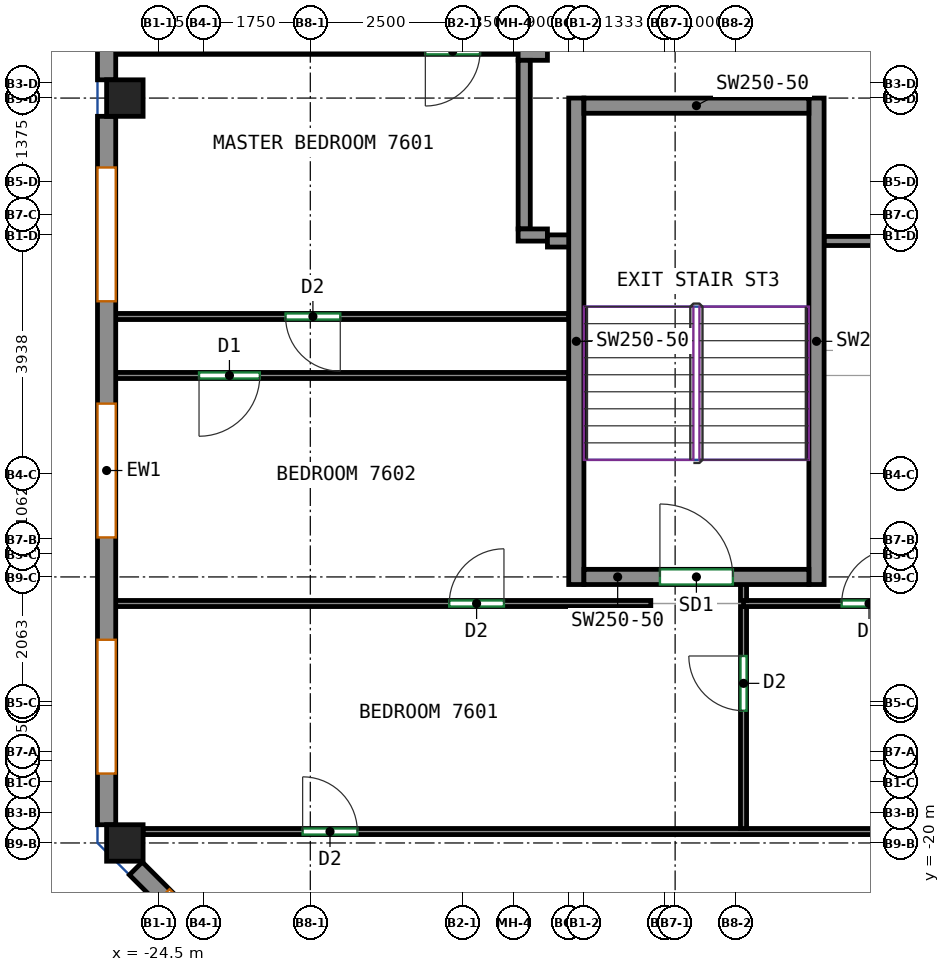
"""IFC4 building model, lengths in metres.
Left out: names, types, materials, properties, quantities, classifications, styles, units other than length and angle.
Written with IfcOpenShell. Run it as: python <this file> out.ifc"""

import sys

from ifc_helpers import new_model, si_unit, direction, frame, frame_2d, origin, origin_2d, place, context, subcontext, project, spatial, rectangle, extrude, source, transform, mapped, element, fill, save


model = new_model("IFC4")
c1 = context("Model", 3, precision=1e-05, world=origin(), true_north=direction((0.0, 1.0)))
c2 = subcontext(c1, "Body", "Model", "MODEL_VIEW")
j1 = project(units=[si_unit("LENGTHUNIT", "METRE"), si_unit("PLANEANGLEUNIT", "RADIAN")], contexts=[c1])
p1 = place(None, origin())
s1 = spatial("IfcSite", under=j1, at=p1, CompositionType="ELEMENT")
p2 = place(p1, origin())
s2 = spatial("IfcBuilding", under=s1, at=p2, CompositionType="ELEMENT")
p3 = place(p2, frame((0.0, 0.0, 305.2)))
s3 = spatial("IfcBuildingStorey", under=s2, at=p3, CompositionType="ELEMENT", Elevation=305.2)
m1 = source(origin(), c2, "Body", "SweptSolid", [
    extrude(rectangle(XDim=0.6, YDim=0.6, at=origin_2d()), origin(), (0.0, 0.0, 1.0), 3.12),
])
for number, where, z_axis, x_axis in (
    (1, (-25.05, -20.0, 0.0), (0.0, 0.0, 1.0), (1.0, 0.0, 0.0)),
    (2, (-25.05, -7.75, 0.0), (0.0, 0.0, 1.0), (1.0, 0.0, 0.0)),
):
    element("IfcColumn", number, at=place(p3, frame(where, z_axis=z_axis, x_axis=x_axis)), inside=s3, PredefinedType="COLUMN", context=c2, shape_type="MappedRepresentation", body=[
        mapped(m1, transform((0.0, 0.0, 0.0))),
    ])
m2 = source(origin(), c2, "Body", "SweptSolid", [
    extrude(rectangle(XDim=8.0, YDim=0.25, at=frame_2d((4.0, 0.0))), origin(), (0.0, 0.0, 1.0), 3.12),
])
for number, where, z_axis, x_axis in (
    (3, (-17.625, -15.75, 0.0), (0.0, 0.0, 1.0), (0.0, 1.0, 0.0)),
    (4, (-13.675, -15.75, 0.0), (0.0, 0.0, 1.0), (0.0, 1.0, 0.0)),
):
    element("IfcWall", number, at=place(p3, frame(where, z_axis=z_axis, x_axis=x_axis)), inside=s3, PredefinedType="SHEAR", context=c2, shape_type="MappedRepresentation", body=[
        mapped(m2, transform((0.0, 0.0, 0.0))),
    ])
m3 = source(origin(), c2, "Body", "SweptSolid", [
    extrude(rectangle(XDim=3.7, YDim=0.25, at=frame_2d((1.85, 0.0))), origin(), (0.0, 0.0, 1.0), 3.12),
])
p4 = place(p3, frame((-17.5, -15.625, 0.0), z_axis=(0.0, 0.0, 1.0), x_axis=(1.0, 0.0, 0.0)))
e5 = element("IfcWall", 5, at=p4, inside=s3, PredefinedType="SHEAR", context=c2, shape_type="MappedRepresentation", body=[
    mapped(m3, transform((0.0, 0.0, 0.0))),
])
p5 = place(p4, frame((1.25, 0.0, 0.0)))
e6 = element("IfcOpeningElement", 6, at=p5, cuts=e5, PredefinedType="OPENING", context=c2, shape_type="SweptSolid", body=[
    extrude(rectangle(XDim=1.2, YDim=2.1, at=frame_2d((0.6, 1.05))), frame((0.0, 0.135, 0.0), z_axis=(0.0, -1.0, 0.0), x_axis=(1.0, 0.0, 0.0)), (0.0, 0.0, 1.0), 0.27),
])
p6 = place(p3, frame((-17.5, -7.875, 0.0), z_axis=(0.0, 0.0, 1.0), x_axis=(1.0, 0.0, 0.0)))
e7 = element("IfcWall", 7, at=p6, inside=s3, PredefinedType="SHEAR", context=c2, shape_type="MappedRepresentation", body=[
    mapped(m3, transform((0.0, 0.0, 0.0))),
])
m4 = source(origin(), c2, "Body", "SweptSolid", [
    extrude(rectangle(XDim=7.275, YDim=0.3, at=frame_2d((3.637, 0.0))), origin(), (0.0, 0.0, 1.0), 3.12),
])
p7 = place(p3, frame((-25.35, -0.175, 0.0), z_axis=(0.0, 0.0, 1.0), x_axis=(0.0, -1.0, 0.0)))
e8 = element("IfcWall", 8, at=p7, inside=s3, PredefinedType="SOLIDWALL", context=c2, shape_type="MappedRepresentation", body=[
    mapped(m4, transform((0.0, 0.0, 0.0))),
])
p8 = place(p7, frame((0.719, 0.0, 0.8)))
e9 = element("IfcOpeningElement", 9, at=p8, cuts=e8, PredefinedType="OPENING", context=c2, shape_type="SweptSolid", body=[
    extrude(rectangle(XDim=2.2, YDim=2.05, at=frame_2d((1.1, 1.025))), frame((0.0, 0.16, 0.0), z_axis=(0.0, -1.0, 0.0), x_axis=(1.0, 0.0, 0.0)), (0.0, 0.0, 1.0), 0.32),
])
p9 = place(p7, frame((4.356, 0.0, 0.8)))
e10 = element("IfcOpeningElement", 10, at=p9, cuts=e8, PredefinedType="OPENING", context=c2, shape_type="SweptSolid", body=[
    extrude(rectangle(XDim=2.2, YDim=2.05, at=frame_2d((1.1, 1.025))), frame((0.0, 0.16, 0.0), z_axis=(0.0, -1.0, 0.0), x_axis=(1.0, 0.0, 0.0)), (0.0, 0.0, 1.0), 0.32),
])
m5 = source(origin(), c2, "Body", "SweptSolid", [
    extrude(rectangle(XDim=11.65, YDim=0.3, at=frame_2d((5.825, 0.0))), origin(), (0.0, 0.0, 1.0), 3.12),
])
p10 = place(p3, frame((-25.35, -8.05, 0.0), z_axis=(0.0, 0.0, 1.0), x_axis=(0.0, -1.0, 0.0)))
e11 = element("IfcWall", 11, at=p10, inside=s3, PredefinedType="SOLIDWALL", context=c2, shape_type="MappedRepresentation", body=[
    mapped(m5, transform((0.0, 0.0, 0.0))),
])
p11 = place(p10, frame((0.842, 0.0, 0.8)))
e12 = element("IfcOpeningElement", 12, at=p11, cuts=e11, PredefinedType="OPENING", context=c2, shape_type="SweptSolid", body=[
    extrude(rectangle(XDim=2.2, YDim=2.05, at=frame_2d((1.1, 1.025))), frame((0.0, 0.16, 0.0), z_axis=(0.0, -1.0, 0.0), x_axis=(1.0, 0.0, 0.0)), (0.0, 0.0, 1.0), 0.32),
])
p12 = place(p10, frame((4.725, 0.0, 0.8)))
e13 = element("IfcOpeningElement", 13, at=p12, cuts=e11, PredefinedType="OPENING", context=c2, shape_type="SweptSolid", body=[
    extrude(rectangle(XDim=2.2, YDim=2.05, at=frame_2d((1.1, 1.025))), frame((0.0, 0.16, 0.0), z_axis=(0.0, -1.0, 0.0), x_axis=(1.0, 0.0, 0.0)), (0.0, 0.0, 1.0), 0.32),
])
p13 = place(p10, frame((8.608, 0.0, 0.8)))
e14 = element("IfcOpeningElement", 14, at=p13, cuts=e11, PredefinedType="OPENING", context=c2, shape_type="SweptSolid", body=[
    extrude(rectangle(XDim=2.2, YDim=2.05, at=frame_2d((1.1, 1.025))), frame((0.0, 0.16, 0.0), z_axis=(0.0, -1.0, 0.0), x_axis=(1.0, 0.0, 0.0)), (0.0, 0.0, 1.0), 0.32),
])
m6 = source(origin(), c2, "Body", "SweptSolid", [
    extrude(rectangle(XDim=3.465, YDim=0.3, at=frame_2d((1.732, 0.0))), origin(), (0.0, 0.0, 1.0), 3.12),
])
p14 = place(p3, frame((-24.869, -20.419, 0.0), z_axis=(0.0, 0.0, 1.0), x_axis=(0.707106781187, -0.707106781187, 0.0)))
e15 = element("IfcWall", 15, at=p14, inside=s3, PredefinedType="SOLIDWALL", context=c2, shape_type="MappedRepresentation", body=[
    mapped(m6, transform((0.0, 0.0, 0.0))),
])
p15 = place(p14, frame((0.632, 0.0, 0.8)))
e16 = element("IfcOpeningElement", 16, at=p15, cuts=e15, PredefinedType="OPENING", context=c2, shape_type="SweptSolid", body=[
    extrude(rectangle(XDim=2.2, YDim=2.05, at=frame_2d((1.1, 1.025))), frame((0.0, 0.16, 0.0), z_axis=(0.0, -1.0, 0.0), x_axis=(1.0, 0.0, 0.0)), (0.0, 0.0, 1.0), 0.32),
])
p16 = place(p3, frame((-13.55, -10.1, 0.0), z_axis=(0.0, 0.0, 1.0), x_axis=(1.0, 0.0, 0.0)))
e17 = element("IfcWall", 17, at=p16, inside=s3, PredefinedType="PARTITIONING", context=c2, shape_type="SweptSolid", body=[
    extrude(rectangle(XDim=30.65, YDim=0.15, at=frame_2d((15.325, 0.0))), origin(), (0.0, 0.0, 1.0), 3.12),
])
p17 = place(p16, frame((6.956, 0.0, 0.0)))
e18 = element("IfcOpeningElement", 18, at=p17, cuts=e17, PredefinedType="OPENING", context=c2, shape_type="SweptSolid", body=[
    extrude(rectangle(XDim=0.9, YDim=2.1, at=frame_2d((0.45, 1.05))), frame((0.0, 0.085, 0.0), z_axis=(0.0, -1.0, 0.0), x_axis=(1.0, 0.0, 0.0)), (0.0, 0.0, 1.0), 0.17),
])
p18 = place(p16, frame((10.643, 0.0, 0.0)))
e19 = element("IfcOpeningElement", 19, at=p18, cuts=e17, PredefinedType="OPENING", context=c2, shape_type="SweptSolid", body=[
    extrude(rectangle(XDim=0.9, YDim=2.1, at=frame_2d((0.45, 1.05))), frame((0.0, 0.085, 0.0), z_axis=(0.0, -1.0, 0.0), x_axis=(1.0, 0.0, 0.0)), (0.0, 0.0, 1.0), 0.17),
])
p19 = place(p16, frame((24.155, 0.0, 0.0)))
e20 = element("IfcOpeningElement", 20, at=p19, cuts=e17, PredefinedType="OPENING", context=c2, shape_type="SweptSolid", body=[
    extrude(rectangle(XDim=0.9, YDim=2.1, at=frame_2d((0.45, 1.05))), frame((0.0, 0.085, 0.0), z_axis=(0.0, -1.0, 0.0), x_axis=(1.0, 0.0, 0.0)), (0.0, 0.0, 1.0), 0.17),
])
p20 = place(p3, frame((-24.75, -19.812, 0.0), z_axis=(0.0, 0.0, 1.0), x_axis=(1.0, 0.0, 0.0)))
e21 = element("IfcWall", 21, at=p20, inside=s3, PredefinedType="PARTITIONING", context=c2, shape_type="SweptSolid", body=[
    extrude(rectangle(XDim=20.35, YDim=0.1, at=frame_2d((10.175, 0.0))), origin(), (0.0, 0.0, 1.0), 3.12),
])
p21 = place(p20, frame((2.624, 0.0, 0.0)))
e22 = element("IfcOpeningElement", 22, at=p21, cuts=e21, PredefinedType="OPENING", context=c2, shape_type="SweptSolid", body=[
    extrude(rectangle(XDim=0.9, YDim=2.1, at=frame_2d((0.45, 1.05))), frame((0.0, 0.06, 0.0), z_axis=(0.0, -1.0, 0.0), x_axis=(1.0, 0.0, 0.0)), (0.0, 0.0, 1.0), 0.12),
])
p22 = place(p3, frame((-14.875, -19.762, 0.0), z_axis=(0.0, 0.0, 1.0), x_axis=(0.0, 1.0, 0.0)))
e23 = element("IfcWall", 23, at=p22, inside=s3, PredefinedType="PARTITIONING", context=c2, shape_type="SweptSolid", body=[
    extrude(rectangle(XDim=3.65, YDim=0.1, at=frame_2d((1.825, 0.0))), origin(), (0.0, 0.0, 1.0), 3.12),
])
p23 = place(p22, frame((1.937, 0.0, 0.0)))
e24 = element("IfcOpeningElement", 24, at=p23, cuts=e23, PredefinedType="OPENING", context=c2, shape_type="SweptSolid", body=[
    extrude(rectangle(XDim=0.9, YDim=2.1, at=frame_2d((0.45, 1.05))), frame((0.0, 0.06, 0.0), z_axis=(0.0, -1.0, 0.0), x_axis=(1.0, 0.0, 0.0)), (0.0, 0.0, 1.0), 0.12),
])
p24 = place(p3, frame((-25.25, -16.062, 0.0), z_axis=(0.0, 0.0, 1.0), x_axis=(1.0, 0.0, 0.0)))
e25 = element("IfcWall", 25, at=p24, inside=s3, PredefinedType="PARTITIONING", context=c2, shape_type="SweptSolid", body=[
    extrude(rectangle(XDim=8.85, YDim=0.1, at=frame_2d((4.425, 0.0))), origin(), (0.0, 0.0, 1.0), 3.12),
])
p25 = place(p24, frame((5.535, 0.0, 0.0)))
e26 = element("IfcOpeningElement", 26, at=p25, cuts=e25, PredefinedType="OPENING", context=c2, shape_type="SweptSolid", body=[
    extrude(rectangle(XDim=0.9, YDim=2.1, at=frame_2d((0.45, 1.05))), frame((0.0, 0.06, 0.0), z_axis=(0.0, -1.0, 0.0), x_axis=(1.0, 0.0, 0.0)), (0.0, 0.0, 1.0), 0.12),
])
p26 = place(p3, frame((-14.875, -16.062, 0.0), z_axis=(0.0, 0.0, 1.0), x_axis=(1.0, 0.0, 0.0)))
e27 = element("IfcWall", 27, at=p26, inside=s3, PredefinedType="PARTITIONING", context=c2, shape_type="SweptSolid", body=[
    extrude(rectangle(XDim=6.45, YDim=0.1, at=frame_2d((3.225, 0.0))), origin(), (0.0, 0.0, 1.0), 3.12),
])
p27 = place(p26, frame((1.614, 0.0, 0.0)))
e28 = element("IfcOpeningElement", 28, at=p27, cuts=e27, PredefinedType="OPENING", context=c2, shape_type="SweptSolid", body=[
    extrude(rectangle(XDim=0.9, YDim=2.1, at=frame_2d((0.45, 1.05))), frame((0.0, 0.06, 0.0), z_axis=(0.0, -1.0, 0.0), x_axis=(1.0, 0.0, 0.0)), (0.0, 0.0, 1.0), 0.12),
])
p28 = place(p3, frame((-14.875, -16.012, 0.0), z_axis=(0.0, 0.0, 1.0), x_axis=(0.0, 1.0, 0.0)))
e29 = element("IfcWall", 29, at=p28, inside=s3, PredefinedType="PARTITIONING", context=c2, shape_type="SweptSolid", body=[
    extrude(rectangle(XDim=0.312, YDim=0.1, at=frame_2d((0.156, 0.0))), origin(), (0.0, 0.0, 1.0), 3.12),
])
p29 = place(p3, frame((-17.75, -12.312, 0.0), z_axis=(0.0, 0.0, 1.0), x_axis=(-1.0, 0.0, 0.0)))
e30 = element("IfcWall", 30, at=p29, inside=s3, PredefinedType="PARTITIONING", context=c2, shape_type="SweptSolid", body=[
    extrude(rectangle(XDim=7.5, YDim=0.1, at=frame_2d((3.75, 0.0))), origin(), (0.0, 0.0, 1.0), 3.12),
])
p30 = place(p29, frame((5.08, 0.0, 0.0)))
e31 = element("IfcOpeningElement", 31, at=p30, cuts=e30, PredefinedType="OPENING", context=c2, shape_type="SweptSolid", body=[
    extrude(rectangle(XDim=1.0, YDim=2.1, at=frame_2d((0.5, 1.05))), frame((0.0, 0.06, 0.0), z_axis=(0.0, -1.0, 0.0), x_axis=(1.0, 0.0, 0.0)), (0.0, 0.0, 1.0), 0.12),
])
p31 = place(p3, frame((-17.75, -11.342, 0.0), z_axis=(0.0, 0.0, 1.0), x_axis=(-1.0, 0.0, 0.0)))
e32 = element("IfcWall", 32, at=p31, inside=s3, PredefinedType="PARTITIONING", context=c2, shape_type="SweptSolid", body=[
    extrude(rectangle(XDim=7.5, YDim=0.1, at=frame_2d((3.75, 0.0))), origin(), (0.0, 0.0, 1.0), 3.12),
])
p32 = place(p31, frame((3.757, 0.0, 0.0)))
e33 = element("IfcOpeningElement", 33, at=p32, cuts=e32, PredefinedType="OPENING", context=c2, shape_type="SweptSolid", body=[
    extrude(rectangle(XDim=0.9, YDim=2.1, at=frame_2d((0.45, 1.05))), frame((0.0, 0.06, 0.0), z_axis=(0.0, -1.0, 0.0), x_axis=(1.0, 0.0, 0.0)), (0.0, 0.0, 1.0), 0.12),
])
p33 = place(p3, frame((-18.582, -6.981, 0.0), z_axis=(0.0, 0.0, 1.0), x_axis=(-1.0, 0.0, 0.0)))
e34 = element("IfcWall", 34, at=p33, inside=s3, PredefinedType="PARTITIONING", context=c2, shape_type="SweptSolid", body=[
    extrude(rectangle(XDim=6.668, YDim=0.1, at=frame_2d((3.334, 0.0))), origin(), (0.0, 0.0, 1.0), 3.12),
])
p34 = place(p33, frame((0.626, 0.0, 0.0)))
e35 = element("IfcOpeningElement", 35, at=p34, cuts=e34, PredefinedType="OPENING", context=c2, shape_type="SweptSolid", body=[
    extrude(rectangle(XDim=0.9, YDim=2.1, at=frame_2d((0.45, 1.05))), frame((0.0, 0.06, 0.0), z_axis=(0.0, -1.0, 0.0), x_axis=(1.0, 0.0, 0.0)), (0.0, 0.0, 1.0), 0.12),
])
p35 = place(p3, frame((-18.582, -7.029, 0.0), z_axis=(0.0, 0.0, 1.0), x_axis=(1.0, 0.0, 0.0)))
e36 = element("IfcWall", 36, at=p35, inside=s3, PredefinedType="PARTITIONING", context=c2, shape_type="SweptSolid", body=[
    extrude(rectangle(XDim=0.482, YDim=0.2, at=frame_2d((0.241, 0.0))), origin(), (0.0, 0.0, 1.0), 3.12),
])
p36 = place(p3, frame((-18.482, -9.902, 0.0), z_axis=(0.0, 0.0, 1.0), x_axis=(0.0, 1.0, 0.0)))
e37 = element("IfcWall", 37, at=p36, inside=s3, PredefinedType="PARTITIONING", context=c2, shape_type="SweptSolid", body=[
    extrude(rectangle(XDim=2.773, YDim=0.2, at=frame_2d((1.387, 0.0))), origin(), (0.0, 0.0, 1.0), 3.12),
])
p37 = place(p3, frame((-18.1, -10.002, 0.0), z_axis=(0.0, 0.0, 1.0), x_axis=(-1.0, 0.0, 0.0)))
e38 = element("IfcWall", 38, at=p37, inside=s3, PredefinedType="PARTITIONING", context=c2, shape_type="SweptSolid", body=[
    extrude(rectangle(XDim=0.482, YDim=0.2, at=frame_2d((0.241, 0.0))), origin(), (0.0, 0.0, 1.0), 3.12),
])
p38 = place(p3, frame((-17.7, -10.1, 0.0), z_axis=(0.0, 0.0, 1.0), x_axis=(-1.0, 0.0, 0.0)))
e39 = element("IfcWall", 39, at=p38, inside=s3, PredefinedType="PARTITIONING", context=c2, shape_type="SweptSolid", body=[
    extrude(rectangle(XDim=0.4, YDim=0.2, at=frame_2d((0.2, 0.0))), origin(), (0.0, 0.0, 1.0), 3.12),
])
p39 = place(p11, origin())
e40 = element("IfcWindow", 40, at=p39, inside=s3, PartitioningType="SINGLE_PANEL", PredefinedType="WINDOW", context=c2, shape_type="SweptSolid", body=[
    extrude(rectangle(XDim=2.2, YDim=2.05, at=frame_2d((1.1, 1.025))), frame((0.0, 0.03, 0.0), z_axis=(0.0, -1.0, 0.0), x_axis=(1.0, 0.0, 0.0)), (0.0, 0.0, 1.0), 0.06),
])
fill(e12, e40)
p40 = place(p12, origin())
e41 = element("IfcWindow", 41, at=p40, inside=s3, PartitioningType="SINGLE_PANEL", PredefinedType="WINDOW", context=c2, shape_type="SweptSolid", body=[
    extrude(rectangle(XDim=2.2, YDim=2.05, at=frame_2d((1.1, 1.025))), frame((0.0, 0.03, 0.0), z_axis=(0.0, -1.0, 0.0), x_axis=(1.0, 0.0, 0.0)), (0.0, 0.0, 1.0), 0.06),
])
fill(e13, e41)
p41 = place(p13, origin())
e42 = element("IfcWindow", 42, at=p41, inside=s3, PartitioningType="SINGLE_PANEL", PredefinedType="WINDOW", context=c2, shape_type="SweptSolid", body=[
    extrude(rectangle(XDim=2.2, YDim=2.05, at=frame_2d((1.1, 1.025))), frame((0.0, 0.03, 0.0), z_axis=(0.0, -1.0, 0.0), x_axis=(1.0, 0.0, 0.0)), (0.0, 0.0, 1.0), 0.06),
])
fill(e14, e42)
p42 = place(p5, origin())
e43 = element("IfcDoor", 43, at=p42, inside=s3, OperationType="DOUBLE_DOOR_SINGLE_SWING", PredefinedType="DOOR", context=c2, shape_type="SweptSolid", body=[
    extrude(rectangle(XDim=1.2, YDim=2.1, at=frame_2d((0.6, 1.05))), frame((0.0, 0.025, 0.0), z_axis=(0.0, -1.0, 0.0), x_axis=(1.0, 0.0, 0.0)), (0.0, 0.0, 1.0), 0.05),
])
fill(e6, e43)
p43 = place(p21, origin())
e44 = element("IfcDoor", 44, at=p43, inside=s3, OperationType="SINGLE_SWING_LEFT", PredefinedType="DOOR", context=c2, shape_type="SweptSolid", body=[
    extrude(rectangle(XDim=0.9, YDim=2.1, at=frame_2d((0.45, 1.05))), frame((0.0, 0.025, 0.0), z_axis=(0.0, -1.0, 0.0), x_axis=(1.0, 0.0, 0.0)), (0.0, 0.0, 1.0), 0.05),
])
fill(e22, e44)
p44 = place(p23, origin())
e45 = element("IfcDoor", 45, at=p44, inside=s3, OperationType="SINGLE_SWING_RIGHT", PredefinedType="DOOR", context=c2, shape_type="SweptSolid", body=[
    extrude(rectangle(XDim=0.9, YDim=2.1, at=frame_2d((0.45, 1.05))), frame((0.0, 0.025, 0.0), z_axis=(0.0, -1.0, 0.0), x_axis=(1.0, 0.0, 0.0)), (0.0, 0.0, 1.0), 0.05),
])
fill(e24, e45)
p45 = place(p25, origin())
e46 = element("IfcDoor", 46, at=p45, inside=s3, OperationType="SINGLE_SWING_RIGHT", PredefinedType="DOOR", context=c2, shape_type="SweptSolid", body=[
    extrude(rectangle(XDim=0.9, YDim=2.1, at=frame_2d((0.45, 1.05))), frame((0.0, 0.025, 0.0), z_axis=(0.0, -1.0, 0.0), x_axis=(1.0, 0.0, 0.0)), (0.0, 0.0, 1.0), 0.05),
])
fill(e26, e46)
p46 = place(p27, origin())
e47 = element("IfcDoor", 47, at=p46, inside=s3, OperationType="SINGLE_SWING_RIGHT", PredefinedType="DOOR", context=c2, shape_type="SweptSolid", body=[
    extrude(rectangle(XDim=0.9, YDim=2.1, at=frame_2d((0.45, 1.05))), frame((0.0, 0.025, 0.0), z_axis=(0.0, -1.0, 0.0), x_axis=(1.0, 0.0, 0.0)), (0.0, 0.0, 1.0), 0.05),
])
fill(e28, e47)
p47 = place(p30, origin())
e48 = element("IfcDoor", 48, at=p47, inside=s3, OperationType="SINGLE_SWING_RIGHT", PredefinedType="DOOR", context=c2, shape_type="SweptSolid", body=[
    extrude(rectangle(XDim=1.0, YDim=2.1, at=frame_2d((0.5, 1.05))), frame((0.0, 0.025, 0.0), z_axis=(0.0, -1.0, 0.0), x_axis=(1.0, 0.0, 0.0)), (0.0, 0.0, 1.0), 0.05),
])
fill(e31, e48)
p48 = place(p32, origin())
e49 = element("IfcDoor", 49, at=p48, inside=s3, OperationType="SINGLE_SWING_LEFT", PredefinedType="DOOR", context=c2, shape_type="SweptSolid", body=[
    extrude(rectangle(XDim=0.9, YDim=2.1, at=frame_2d((0.45, 1.05))), frame((0.0, 0.025, 0.0), z_axis=(0.0, -1.0, 0.0), x_axis=(1.0, 0.0, 0.0)), (0.0, 0.0, 1.0), 0.05),
])
fill(e33, e49)
p49 = place(p34, origin())
e50 = element("IfcDoor", 50, at=p49, inside=s3, OperationType="SINGLE_SWING_RIGHT", PredefinedType="DOOR", context=c2, shape_type="SweptSolid", body=[
    extrude(rectangle(XDim=0.9, YDim=2.1, at=frame_2d((0.45, 1.05))), frame((0.0, 0.025, 0.0), z_axis=(0.0, -1.0, 0.0), x_axis=(1.0, 0.0, 0.0)), (0.0, 0.0, 1.0), 0.05),
])
fill(e35, e50)
save(model, sys.argv[1])
